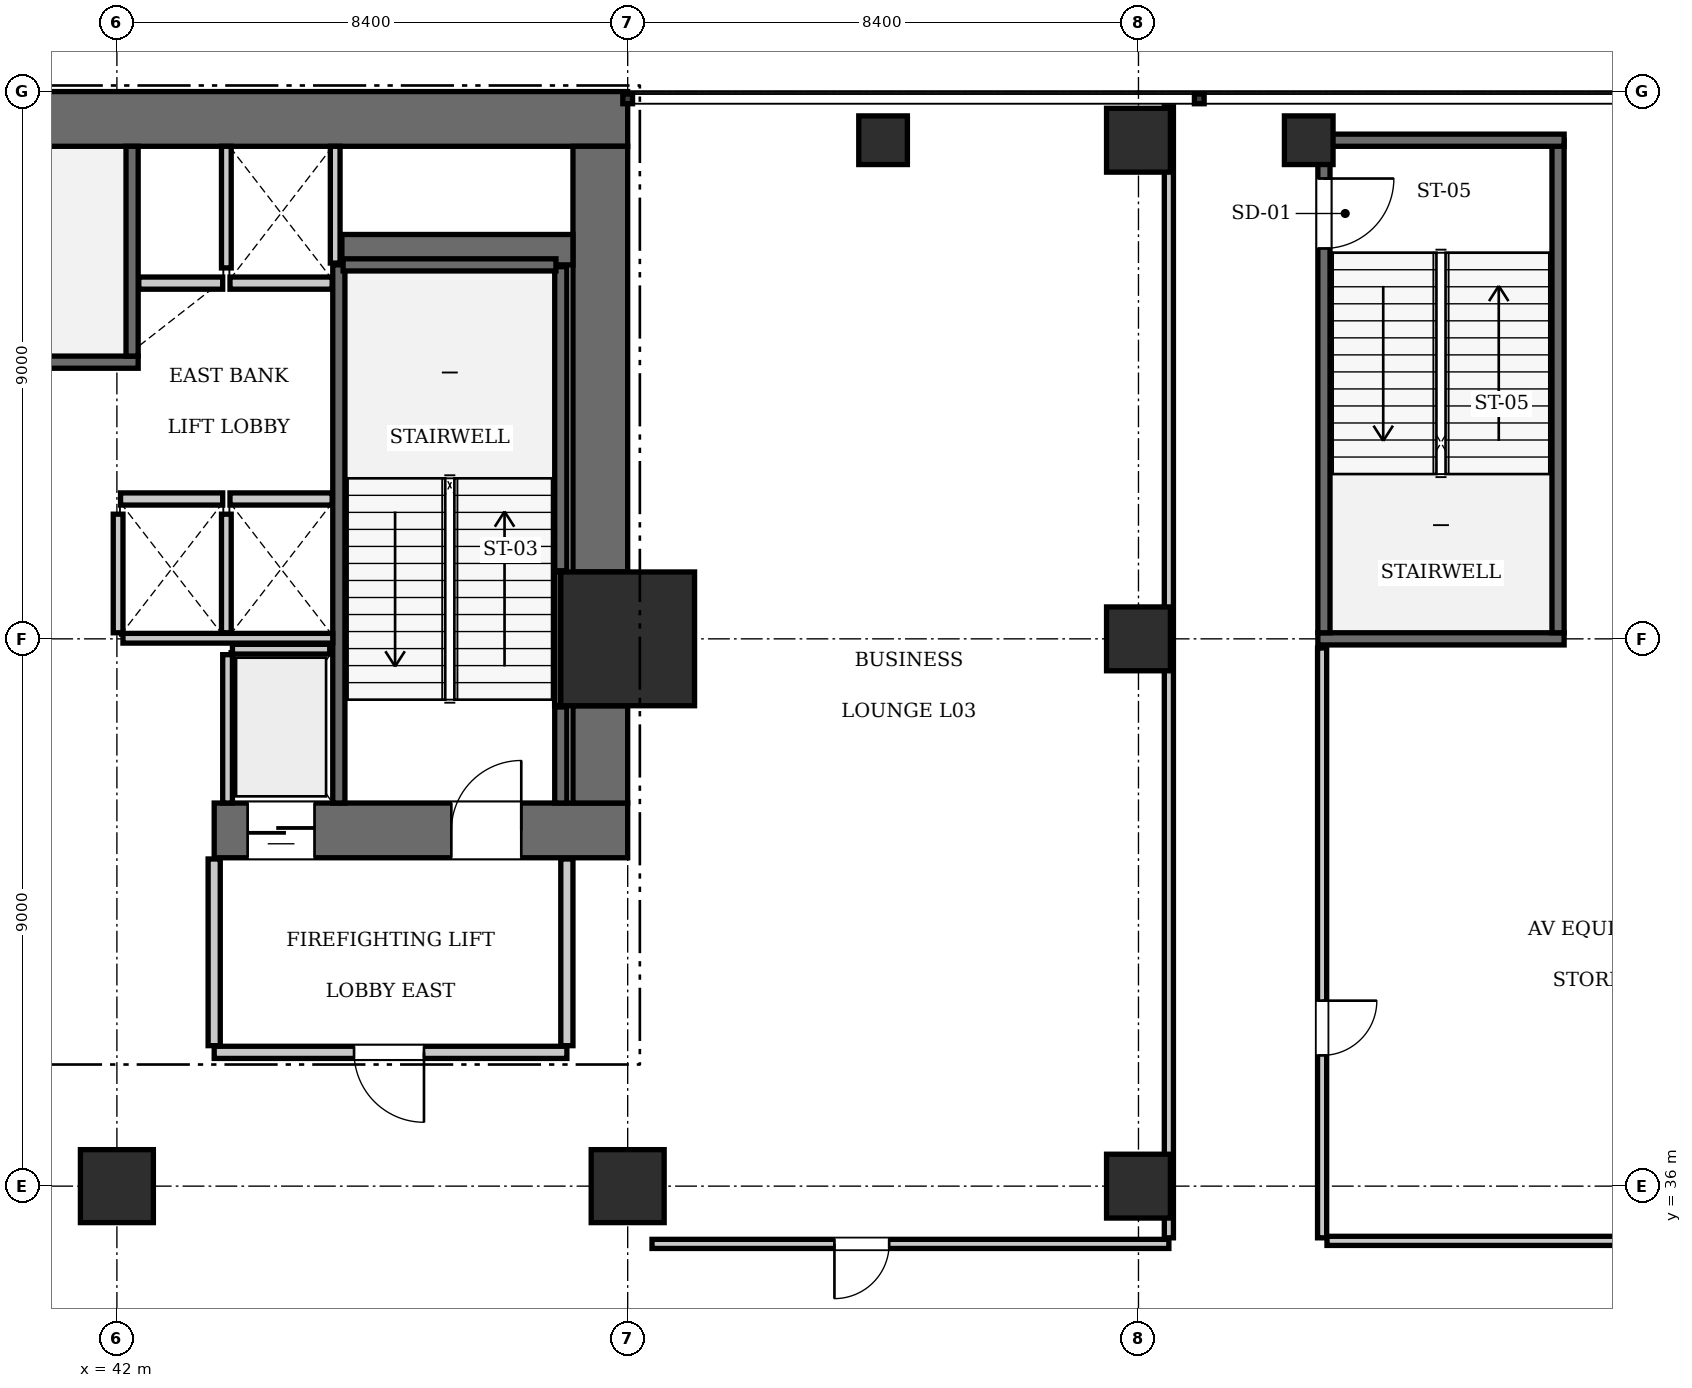
"""IFC4 building model, lengths in metres.
Left out: names, types, materials, properties, quantities, classifications, styles, units other than length and angle.
Written with IfcOpenShell. Run it as: python <this file> out.ifc"""

import sys

from ifc_helpers import new_model, si_unit, direction, frame, frame_2d, origin, origin_2d, place, context, subcontext, project, spatial, rectangle, extrude, element, fill, save


model = new_model("IFC4")
c1 = context("Model", 3, precision=1e-05, world=origin(), true_north=direction((0.0, 1.0)))
c2 = subcontext(c1, "Body", "Model", "MODEL_VIEW")
j1 = project(units=[si_unit("LENGTHUNIT", "METRE"), si_unit("PLANEANGLEUNIT", "RADIAN")], contexts=[c1])
p1 = place(None, origin())
s1 = spatial("IfcSite", under=j1, at=p1, CompositionType="ELEMENT")
p2 = place(p1, origin())
s2 = spatial("IfcBuilding", under=s1, at=p2, CompositionType="ELEMENT")
p3 = place(p2, frame((0.0, 0.0, 16.45)))
s3 = spatial("IfcBuildingStorey", under=s2, at=p3, CompositionType="ELEMENT", Elevation=16.45)
p4 = place(p3, frame((50.4, 45.0, 0.0), z_axis=(0.0, 0.0, 1.0), x_axis=(1.0, 0.0, 0.0)))
e1 = element("IfcColumn", 1, at=p4, inside=s3, PredefinedType="COLUMN", context=c2, shape_type="SweptSolid", body=[
    extrude(rectangle(XDim=2.2, YDim=2.2, at=origin_2d()), origin(), (0.0, 0.0, 1.0), 4.9),
])
p5 = place(p3, frame((25.2, 53.55, 0.0), z_axis=(0.0, 0.0, 1.0), x_axis=(1.0, 0.0, 0.0)))
e2 = element("IfcWall", 2, at=p5, inside=s3, PredefinedType="SHEAR", context=c2, shape_type="SweptSolid", body=[
    extrude(rectangle(XDim=25.2, YDim=0.9, at=frame_2d((12.6, 0.0))), origin(), (0.0, 0.0, 1.0), 4.9),
])
p6 = place(p3, frame((43.6, 41.85, 0.0), z_axis=(0.0, 0.0, 1.0), x_axis=(1.0, 0.0, 0.0)))
e3 = element("IfcWall", 3, at=p6, inside=s3, PredefinedType="SHEAR", context=c2, shape_type="SweptSolid", body=[
    extrude(rectangle(XDim=6.8, YDim=0.9, at=frame_2d((3.4, 0.0))), origin(), (0.0, 0.0, 1.0), 4.9),
])
p7 = place(p6, frame((3.9, 0.0, 0.0)))
e4 = element("IfcOpeningElement", 4, at=p7, cuts=e3, PredefinedType="OPENING", context=c2, shape_type="SweptSolid", body=[
    extrude(rectangle(XDim=1.15, YDim=2.15, at=frame_2d((0.575, 1.075))), frame((0.0, 0.46, 0.0), z_axis=(0.0, -1.0, 0.0), x_axis=(1.0, 0.0, 0.0)), (0.0, 0.0, 1.0), 0.92),
])
p8 = place(p6, frame((0.55, 0.0, 0.0)))
e5 = element("IfcOpeningElement", 5, at=p8, cuts=e3, PredefinedType="OPENING", context=c2, shape_type="SweptSolid", body=[
    extrude(rectangle(XDim=1.1, YDim=2.2, at=frame_2d((0.55, 1.1))), frame((0.0, 0.46, 0.0), z_axis=(0.0, -1.0, 0.0), x_axis=(1.0, 0.0, 0.0)), (0.0, 0.0, 1.0), 0.92),
])
p9 = place(p3, frame((49.95, 42.3, 0.0), z_axis=(0.0, 0.0, 1.0), x_axis=(0.0, 1.0, 0.0)))
e6 = element("IfcWall", 6, at=p9, inside=s3, PredefinedType="SHEAR", context=c2, shape_type="SweptSolid", body=[
    extrude(rectangle(XDim=1.6, YDim=0.9, at=frame_2d((0.8, 0.0))), origin(), (0.0, 0.0, 1.0), 4.9),
])
p10 = place(p3, frame((49.95, 46.1, 0.0), z_axis=(0.0, 0.0, 1.0), x_axis=(0.0, 1.0, 0.0)))
e7 = element("IfcWall", 7, at=p10, inside=s3, PredefinedType="SHEAR", context=c2, shape_type="SweptSolid", body=[
    extrude(rectangle(XDim=7.0, YDim=0.9, at=frame_2d((3.5, 0.0))), origin(), (0.0, 0.0, 1.0), 4.9),
])
p11 = place(p3, frame((45.7, 51.4, 0.0), z_axis=(0.0, 0.0, 1.0), x_axis=(1.0, 0.0, 0.0)))
e8 = element("IfcWall", 8, at=p11, inside=s3, PredefinedType="SHEAR", context=c2, shape_type="SweptSolid", body=[
    extrude(rectangle(XDim=3.8, YDim=0.5, at=frame_2d((1.9, 0.0))), origin(), (0.0, 0.0, 1.0), 4.9),
])
for number, where, z_axis, x_axis in (
    (9, (42.0, 36.0, 0.0), (0.0, 0.0, 1.0), (1.0, 0.0, 0.0)),
    (10, (50.4, 36.0, 0.0), (0.0, 0.0, 1.0), (1.0, 0.0, 0.0)),
):
    element("IfcColumn", number, at=place(p3, frame(where, z_axis=z_axis, x_axis=x_axis)), inside=s3, PredefinedType="COLUMN", context=c2, shape_type="SweptSolid", body=[
        extrude(rectangle(XDim=1.2, YDim=1.2, at=origin_2d()), origin(), (0.0, 0.0, 1.0), 4.9),
    ])
for number, where, z_axis, x_axis in (
    (11, (58.8, 36.0, 0.0), (0.0, 0.0, 1.0), (1.0, 0.0, 0.0)),
    (12, (58.8, 45.0, 0.0), (0.0, 0.0, 1.0), (1.0, 0.0, 0.0)),
    (13, (58.8, 53.2, 0.0), (0.0, 0.0, 1.0), (1.0, 0.0, 0.0)),
):
    element("IfcColumn", number, at=place(p3, frame(where, z_axis=z_axis, x_axis=x_axis)), inside=s3, PredefinedType="COLUMN", context=c2, shape_type="SweptSolid", body=[
        extrude(rectangle(XDim=1.05, YDim=1.05, at=origin_2d()), origin(), (0.0, 0.0, 1.0), 4.9),
    ])
for number, where, z_axis, x_axis in (
    (14, (54.6, 53.2, 0.0), (0.0, 0.0, 1.0), (1.0, 0.0, 0.0)),
    (15, (61.6, 53.2, 0.0), (0.0, 0.0, 1.0), (1.0, 0.0, 0.0)),
):
    element("IfcColumn", number, at=place(p3, frame(where, z_axis=z_axis, x_axis=x_axis)), inside=s3, PredefinedType="PILASTER", context=c2, shape_type="SweptSolid", body=[
        extrude(rectangle(XDim=0.8, YDim=0.8, at=origin_2d()), origin(), (0.0, 0.0, 1.0), 4.9),
    ])
p12 = place(p3, frame((33.25, 49.55, 0.0), z_axis=(0.0, 0.0, 1.0), x_axis=(1.0, 0.0, 0.0)))
e16 = element("IfcWall", 16, at=p12, inside=s3, PredefinedType="SOLIDWALL", context=c2, shape_type="SweptSolid", body=[
    extrude(rectangle(XDim=9.1, YDim=0.2, at=frame_2d((4.55, 0.0))), origin(), (0.0, 0.0, 1.0), 4.62),
])
p13 = place(p3, frame((42.25, 49.65, 0.0), z_axis=(0.0, 0.0, 1.0), x_axis=(0.0, 1.0, 0.0)))
e17 = element("IfcWall", 17, at=p13, inside=s3, PredefinedType="SOLIDWALL", context=c2, shape_type="SweptSolid", body=[
    extrude(rectangle(XDim=3.45, YDim=0.2, at=frame_2d((1.725, 0.0))), origin(), (0.0, 0.0, 1.0), 4.62),
])
p14 = place(p3, frame((45.65, 42.3, 0.0), z_axis=(0.0, 0.0, 1.0), x_axis=(0.0, 1.0, 0.0)))
e18 = element("IfcWall", 18, at=p14, inside=s3, PredefinedType="SOLIDWALL", context=c2, shape_type="SweptSolid", body=[
    extrude(rectangle(XDim=8.85, YDim=0.2, at=frame_2d((4.425, 0.0))), origin(), (0.0, 0.0, 1.0), 4.62),
])
p15 = place(p3, frame((49.3, 42.3, 0.0), z_axis=(0.0, 0.0, 1.0), x_axis=(0.0, 1.0, 0.0)))
e19 = element("IfcWall", 19, at=p15, inside=s3, PredefinedType="SOLIDWALL", context=c2, shape_type="SweptSolid", body=[
    extrude(rectangle(XDim=1.58, YDim=0.2, at=frame_2d((0.79, 0.0))), origin(), (0.0, 0.0, 1.0), 4.62),
])
p16 = place(p3, frame((49.3, 46.12, 0.0), z_axis=(0.0, 0.0, 1.0), x_axis=(0.0, 1.0, 0.0)))
e20 = element("IfcWall", 20, at=p16, inside=s3, PredefinedType="SOLIDWALL", context=c2, shape_type="SweptSolid", body=[
    extrude(rectangle(XDim=5.0, YDim=0.2, at=frame_2d((2.5, 0.0))), origin(), (0.0, 0.0, 1.0), 4.62),
])
p17 = place(p3, frame((45.72, 51.15, 0.0), z_axis=(0.0, 0.0, 1.0), x_axis=(1.0, 0.0, 0.0)))
e21 = element("IfcWall", 21, at=p17, inside=s3, PredefinedType="SOLIDWALL", context=c2, shape_type="SweptSolid", body=[
    extrude(rectangle(XDim=3.5, YDim=0.2, at=frame_2d((1.75, 0.0))), origin(), (0.0, 0.0, 1.0), 4.62),
])
p18 = place(p3, frame((49.248, 43.9, 0.0), z_axis=(0.0, 0.0, 1.0), x_axis=(0.0, 1.0, 0.0)))
e22 = element("IfcWall", 22, at=p18, inside=s3, PredefinedType="SOLIDWALL", context=c2, shape_type="SweptSolid", body=[
    extrude(rectangle(XDim=2.2, YDim=0.1, at=frame_2d((1.1, 0.0))), origin(), (0.0, 0.0, 1.0), 4.62),
])
p19 = place(p3, frame((61.75, 45.0, 0.0), z_axis=(0.0, 0.0, 1.0), x_axis=(1.0, 0.0, 0.0)))
e23 = element("IfcWall", 23, at=p19, inside=s3, PredefinedType="SOLIDWALL", context=c2, shape_type="SweptSolid", body=[
    extrude(rectangle(XDim=4.05, YDim=0.2, at=frame_2d((2.025, 0.0))), origin(), (0.0, 0.0, 1.0), 3.985),
])
p20 = place(p3, frame((61.85, 45.1, 0.0), z_axis=(0.0, 0.0, 1.0), x_axis=(0.0, 1.0, 0.0)))
e24 = element("IfcWall", 24, at=p20, inside=s3, PredefinedType="SOLIDWALL", context=c2, shape_type="SweptSolid", body=[
    extrude(rectangle(XDim=8.1, YDim=0.2, at=frame_2d((4.05, 0.0))), origin(), (0.0, 0.0, 1.0), 4.62),
])
p21 = place(p20, frame((6.32, 0.0, 0.0)))
e25 = element("IfcOpeningElement", 25, at=p21, cuts=e24, PredefinedType="OPENING", context=c2, shape_type="SweptSolid", body=[
    extrude(rectangle(XDim=1.15, YDim=2.15, at=frame_2d((0.575, 1.075))), frame((0.0, 0.11, 0.0), z_axis=(0.0, -1.0, 0.0), x_axis=(1.0, 0.0, 0.0)), (0.0, 0.0, 1.0), 0.22),
])
p22 = place(p3, frame((65.7, 45.1, 0.0), z_axis=(0.0, 0.0, 1.0), x_axis=(0.0, 1.0, 0.0)))
e26 = element("IfcWall", 26, at=p22, inside=s3, PredefinedType="SOLIDWALL", context=c2, shape_type="SweptSolid", body=[
    extrude(rectangle(XDim=8.1, YDim=0.2, at=frame_2d((4.05, 0.0))), origin(), (0.0, 0.0, 1.0), 4.62),
])
p23 = place(p3, frame((61.75, 53.2, 0.0), z_axis=(0.0, 0.0, 1.0), x_axis=(1.0, 0.0, 0.0)))
e27 = element("IfcWall", 27, at=p23, inside=s3, PredefinedType="SOLIDWALL", context=c2, shape_type="SweptSolid", body=[
    extrude(rectangle(XDim=4.05, YDim=0.2, at=frame_2d((2.025, 0.0))), origin(), (0.0, 0.0, 1.0), 4.62),
])
for number, where, z_axis, x_axis in (
    (28, (42.06, 47.3, 0.0), (0.0, 0.0, 1.0), (1.0, 0.0, 0.0)),
    (29, (43.86, 47.3, 0.0), (0.0, 0.0, 1.0), (1.0, 0.0, 0.0)),
):
    element("IfcWall", number, at=place(p3, frame(where, z_axis=z_axis, x_axis=x_axis)), inside=s3, PredefinedType="SOLIDWALL", context=c2, shape_type="SweptSolid", body=[
        extrude(rectangle(XDim=1.68, YDim=0.2, at=frame_2d((0.84, 0.0))), origin(), (0.0, 0.0, 1.0), 4.62),
    ])
p24 = place(p3, frame((42.36, 50.85, 0.0), z_axis=(0.0, 0.0, 1.0), x_axis=(1.0, 0.0, 0.0)))
e30 = element("IfcWall", 30, at=p24, inside=s3, PredefinedType="SOLIDWALL", context=c2, shape_type="SweptSolid", body=[
    extrude(rectangle(XDim=1.38, YDim=0.2, at=frame_2d((0.69, 0.0))), origin(), (0.0, 0.0, 1.0), 4.62),
])
p25 = place(p3, frame((43.86, 50.85, 0.0), z_axis=(0.0, 0.0, 1.0), x_axis=(1.0, 0.0, 0.0)))
e31 = element("IfcWall", 31, at=p25, inside=s3, PredefinedType="SOLIDWALL", context=c2, shape_type="SweptSolid", body=[
    extrude(rectangle(XDim=1.68, YDim=0.2, at=frame_2d((0.84, 0.0))), origin(), (0.0, 0.0, 1.0), 4.62),
])
p26 = place(p3, frame((43.9, 44.83, 0.0), z_axis=(0.0, 0.0, 1.0), x_axis=(1.0, 0.0, 0.0)))
e32 = element("IfcWall", 32, at=p26, inside=s3, PredefinedType="SOLIDWALL", context=c2, shape_type="SweptSolid", body=[
    extrude(rectangle(XDim=1.6, YDim=0.16, at=frame_2d((0.8, 0.0))), origin(), (0.0, 0.0, 1.0), 4.62),
])
p27 = place(p3, frame((43.82, 42.3, 0.0), z_axis=(0.0, 0.0, 1.0), x_axis=(0.0, 1.0, 0.0)))
e33 = element("IfcWall", 33, at=p27, inside=s3, PredefinedType="SOLIDWALL", context=c2, shape_type="SweptSolid", body=[
    extrude(rectangle(XDim=2.44, YDim=0.16, at=frame_2d((1.22, 0.0))), origin(), (0.0, 0.0, 1.0), 4.62),
])
for number, where, z_axis, x_axis in (
    (34, (42.02, 45.1, 0.0), (0.0, 0.0, 1.0), (0.0, 1.0, 0.0)),
    (35, (43.8, 45.1, 0.0), (0.0, 0.0, 1.0), (0.0, 1.0, 0.0)),
):
    element("IfcWall", number, at=place(p3, frame(where, z_axis=z_axis, x_axis=x_axis)), inside=s3, PredefinedType="SOLIDWALL", context=c2, shape_type="SweptSolid", body=[
        extrude(rectangle(XDim=1.95, YDim=0.16, at=frame_2d((0.975, 0.0))), origin(), (0.0, 0.0, 1.0), 4.62),
    ])
p28 = place(p3, frame((42.1, 45.01, 0.0), z_axis=(0.0, 0.0, 1.0), x_axis=(1.0, 0.0, 0.0)))
e36 = element("IfcWall", 36, at=p28, inside=s3, PredefinedType="SOLIDWALL", context=c2, shape_type="SweptSolid", body=[
    extrude(rectangle(XDim=3.45, YDim=0.16, at=frame_2d((1.725, 0.0))), origin(), (0.0, 0.0, 1.0), 4.62),
])
p29 = place(p3, frame((45.59, 51.18, 0.0), z_axis=(0.0, 0.0, 1.0), x_axis=(0.0, 1.0, 0.0)))
e37 = element("IfcWall", 37, at=p29, inside=s3, PredefinedType="SOLIDWALL", context=c2, shape_type="SweptSolid", body=[
    extrude(rectangle(XDim=1.92, YDim=0.16, at=frame_2d((0.96, 0.0))), origin(), (0.0, 0.0, 1.0), 4.62),
])
p30 = place(p3, frame((43.8, 51.1, 0.0), z_axis=(0.0, 0.0, 1.0), x_axis=(0.0, 1.0, 0.0)))
e38 = element("IfcWall", 38, at=p30, inside=s3, PredefinedType="SOLIDWALL", context=c2, shape_type="SweptSolid", body=[
    extrude(rectangle(XDim=2.0, YDim=0.16, at=frame_2d((1.0, 0.0))), origin(), (0.0, 0.0, 1.0), 4.62),
])
p31 = place(p3, frame((43.6, 38.2, 0.0), z_axis=(0.0, 0.0, 1.0), x_axis=(1.0, 0.0, 0.0)))
e39 = element("IfcWall", 39, at=p31, inside=s3, PredefinedType="PARTITIONING", context=c2, shape_type="SweptSolid", body=[
    extrude(rectangle(XDim=5.8, YDim=0.2, at=frame_2d((2.9, 0.0))), origin(), (0.0, 0.0, 1.0), 4.62),
])
p32 = place(p31, frame((2.3, 0.0, 0.0)))
e40 = element("IfcOpeningElement", 40, at=p32, cuts=e39, PredefinedType="OPENING", context=c2, shape_type="SweptSolid", body=[
    extrude(rectangle(XDim=1.15, YDim=2.15, at=frame_2d((0.575, 1.075))), frame((0.0, 0.11, 0.0), z_axis=(0.0, -1.0, 0.0), x_axis=(1.0, 0.0, 0.0)), (0.0, 0.0, 1.0), 0.22),
])
for number, where, z_axis, x_axis in (
    (41, (43.6, 38.31, 0.0), (0.0, 0.0, 1.0), (0.0, 1.0, 0.0)),
    (42, (49.4, 38.31, 0.0), (0.0, 0.0, 1.0), (0.0, 1.0, 0.0)),
):
    element("IfcWall", number, at=place(p3, frame(where, z_axis=z_axis, x_axis=x_axis)), inside=s3, PredefinedType="PARTITIONING", context=c2, shape_type="SweptSolid", body=[
        extrude(rectangle(XDim=3.07, YDim=0.2, at=frame_2d((1.535, 0.0))), origin(), (0.0, 0.0, 1.0), 4.62),
    ])
p33 = place(p3, frame((50.8, 35.05, 0.0), z_axis=(0.0, 0.0, 1.0), x_axis=(1.0, 0.0, 0.0)))
e43 = element("IfcWall", 43, at=p33, inside=s3, PredefinedType="PARTITIONING", context=c2, shape_type="SweptSolid", body=[
    extrude(rectangle(XDim=8.5, YDim=0.15, at=frame_2d((4.25, 0.0))), origin(), (0.0, 0.0, 1.0), 4.62),
])
p34 = place(p33, frame((3.0, 0.0, 0.0)))
e44 = element("IfcOpeningElement", 44, at=p34, cuts=e43, PredefinedType="OPENING", context=c2, shape_type="SweptSolid", body=[
    extrude(rectangle(XDim=0.9, YDim=2.1, at=frame_2d((0.45, 1.05))), frame((0.0, 0.085, 0.0), z_axis=(0.0, -1.0, 0.0), x_axis=(1.0, 0.0, 0.0)), (0.0, 0.0, 1.0), 0.17),
])
p35 = place(p3, frame((59.3, 35.15, 0.0), z_axis=(0.0, 0.0, 1.0), x_axis=(0.0, 1.0, 0.0)))
e45 = element("IfcWall", 45, at=p35, inside=s3, PredefinedType="PARTITIONING", context=c2, shape_type="SweptSolid", body=[
    extrude(rectangle(XDim=18.6, YDim=0.15, at=frame_2d((9.3, 0.0))), origin(), (0.0, 0.0, 1.0), 4.62),
])
p36 = place(p3, frame((61.82, 35.15, 0.0), z_axis=(0.0, 0.0, 1.0), x_axis=(0.0, 1.0, 0.0)))
e46 = element("IfcWall", 46, at=p36, inside=s3, PredefinedType="PARTITIONING", context=c2, shape_type="SweptSolid", body=[
    extrude(rectangle(XDim=9.7, YDim=0.15, at=frame_2d((4.85, 0.0))), origin(), (0.0, 0.0, 1.0), 4.62),
])
p37 = place(p36, frame((3.0, 0.0, 0.0)))
e47 = element("IfcOpeningElement", 47, at=p37, cuts=e46, PredefinedType="OPENING", context=c2, shape_type="SweptSolid", body=[
    extrude(rectangle(XDim=0.9, YDim=2.1, at=frame_2d((0.45, 1.05))), frame((0.0, 0.085, 0.0), z_axis=(0.0, -1.0, 0.0), x_axis=(1.0, 0.0, 0.0)), (0.0, 0.0, 1.0), 0.17),
])
p38 = place(p3, frame((61.9, 35.1, 0.0), z_axis=(0.0, 0.0, 1.0), x_axis=(1.0, 0.0, 0.0)))
e48 = element("IfcWall", 48, at=p38, inside=s3, PredefinedType="PARTITIONING", context=c2, shape_type="SweptSolid", body=[
    extrude(rectangle(XDim=9.35, YDim=0.15, at=frame_2d((4.675, 0.0))), origin(), (0.0, 0.0, 1.0), 4.62),
])
p39 = place(p7, origin())
e49 = element("IfcDoor", 49, at=p39, inside=s3, OperationType="SINGLE_SWING_RIGHT", PredefinedType="DOOR", context=c2, shape_type="SweptSolid", body=[
    extrude(rectangle(XDim=1.15, YDim=2.15, at=frame_2d((0.575, 1.075))), frame((0.0, 0.025, 0.0), z_axis=(0.0, -1.0, 0.0), x_axis=(1.0, 0.0, 0.0)), (0.0, 0.0, 1.0), 0.05),
])
fill(e4, e49)
p40 = place(p21, frame((1.15, 0.0, 0.0), z_axis=(0.0, 0.0, 1.0), x_axis=(-1.0, 0.0, 0.0)))
e50 = element("IfcDoor", 50, at=p40, inside=s3, OperationType="SINGLE_SWING_LEFT", PredefinedType="DOOR", context=c2, shape_type="SweptSolid", body=[
    extrude(rectangle(XDim=1.15, YDim=2.15, at=frame_2d((0.575, 1.075))), frame((0.0, 0.025, 0.0), z_axis=(0.0, -1.0, 0.0), x_axis=(1.0, 0.0, 0.0)), (0.0, 0.0, 1.0), 0.05),
])
fill(e25, e50)
p41 = place(p8, frame((1.1, 0.0, 0.0), z_axis=(0.0, 0.0, 1.0), x_axis=(-1.0, 0.0, 0.0)))
e51 = element("IfcDoor", 51, at=p41, inside=s3, OperationType="SLIDING_TO_LEFT", PredefinedType="DOOR", context=c2, shape_type="SweptSolid", body=[
    extrude(rectangle(XDim=1.1, YDim=2.2, at=frame_2d((0.55, 1.1))), frame((0.0, 0.025, 0.0), z_axis=(0.0, -1.0, 0.0), x_axis=(1.0, 0.0, 0.0)), (0.0, 0.0, 1.0), 0.05),
])
fill(e5, e51)
p42 = place(p32, frame((1.15, 0.0, 0.0), z_axis=(0.0, 0.0, 1.0), x_axis=(-1.0, 0.0, 0.0)))
e52 = element("IfcDoor", 52, at=p42, inside=s3, OperationType="SINGLE_SWING_LEFT", PredefinedType="DOOR", context=c2, shape_type="SweptSolid", body=[
    extrude(rectangle(XDim=1.15, YDim=2.15, at=frame_2d((0.575, 1.075))), frame((0.0, 0.025, 0.0), z_axis=(0.0, -1.0, 0.0), x_axis=(1.0, 0.0, 0.0)), (0.0, 0.0, 1.0), 0.05),
])
fill(e40, e52)
p43 = place(p34, frame((0.9, 0.0, 0.0), z_axis=(0.0, 0.0, 1.0), x_axis=(-1.0, 0.0, 0.0)))
e53 = element("IfcDoor", 53, at=p43, inside=s3, OperationType="SINGLE_SWING_RIGHT", PredefinedType="DOOR", context=c2, shape_type="SweptSolid", body=[
    extrude(rectangle(XDim=0.9, YDim=2.1, at=frame_2d((0.45, 1.05))), frame((0.0, 0.025, 0.0), z_axis=(0.0, -1.0, 0.0), x_axis=(1.0, 0.0, 0.0)), (0.0, 0.0, 1.0), 0.05),
])
fill(e44, e53)
p44 = place(p37, frame((0.9, 0.0, 0.0), z_axis=(0.0, 0.0, 1.0), x_axis=(-1.0, 0.0, 0.0)))
e54 = element("IfcDoor", 54, at=p44, inside=s3, OperationType="SINGLE_SWING_LEFT", PredefinedType="DOOR", context=c2, shape_type="SweptSolid", body=[
    extrude(rectangle(XDim=0.9, YDim=2.1, at=frame_2d((0.45, 1.05))), frame((0.0, 0.025, 0.0), z_axis=(0.0, -1.0, 0.0), x_axis=(1.0, 0.0, 0.0)), (0.0, 0.0, 1.0), 0.05),
])
fill(e47, e54)
save(model, sys.argv[1])
